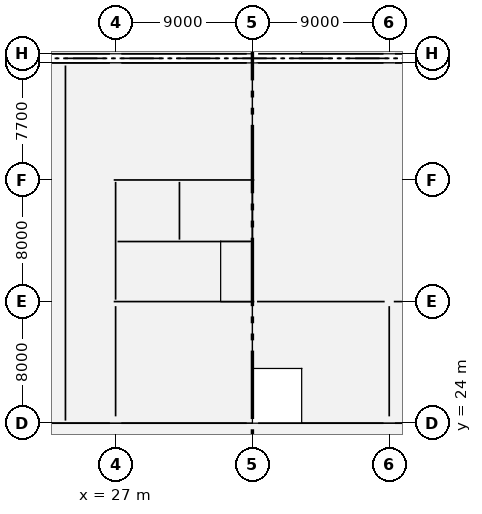
"""IFC4 building model, lengths in metres.
Left out: names, types, materials, properties, quantities, classifications, styles, units other than length and angle.
Written with IfcOpenShell. Run it as: python <this file> out.ifc"""

import sys

from ifc_helpers import new_model, si_unit, direction, frame, frame_2d, origin, origin_2d, place, context, subcontext, project, spatial, rectangle, extrude, element, fill, save


model = new_model("IFC4")
c1 = context("Model", 3, precision=1e-05, world=origin(), true_north=direction((0.0, 1.0)))
c2 = subcontext(c1, "Body", "Model", "MODEL_VIEW")
j1 = project(units=[si_unit("LENGTHUNIT", "METRE"), si_unit("PLANEANGLEUNIT", "RADIAN")], contexts=[c1])
p1 = place(None, origin())
s1 = spatial("IfcSite", under=j1, at=p1, CompositionType="ELEMENT")
p2 = place(p1, origin())
s2 = spatial("IfcBuilding", under=s1, at=p2, CompositionType="ELEMENT")
p3 = place(p2, origin())
s3 = spatial("IfcBuildingStorey", under=s2, at=p3, CompositionType="ELEMENT", Elevation=0.0)
for number, where, z_axis, x_axis in (
    (1, (27.0, 24.0, -0.5), (0.0, 0.0, 1.0), (1.0, 0.0, 0.0)),
    (2, (27.0, 32.0, -0.5), (0.0, 0.0, 1.0), (1.0, 0.0, 0.0)),
    (3, (27.0, 40.0, -0.5), (0.0, 0.0, 1.0), (1.0, 0.0, 0.0)),
):
    element("IfcColumn", number, at=place(p3, frame(where, z_axis=z_axis, x_axis=x_axis)), inside=s3, PredefinedType="COLUMN", context=c2, shape_type="SweptSolid", body=[
        extrude(rectangle(XDim=0.75, YDim=0.75, at=origin_2d()), origin(), (0.0, 0.0, 1.0), 6.8),
    ])
for number, where, z_axis, x_axis in (
    (4, (27.0, 47.7, -0.5), (0.0, 0.0, 1.0), (1.0, 0.0, 0.0)),
    (5, (27.0, 48.3, -0.5), (0.0, 0.0, 1.0), (1.0, 0.0, 0.0)),
):
    element("IfcColumn", number, at=place(p3, frame(where, z_axis=z_axis, x_axis=x_axis)), inside=s3, PredefinedType="COLUMN", context=c2, shape_type="SweptSolid", body=[
        extrude(rectangle(XDim=0.75, YDim=0.55, at=origin_2d()), origin(), (0.0, 0.0, 1.0), 6.8),
    ])
for number, where, z_axis, x_axis in (
    (6, (36.0, 24.0, -0.5), (0.0, 0.0, 1.0), (1.0, 0.0, 0.0)),
    (7, (36.0, 32.0, -0.5), (0.0, 0.0, 1.0), (1.0, 0.0, 0.0)),
    (8, (36.0, 40.0, -0.5), (0.0, 0.0, 1.0), (1.0, 0.0, 0.0)),
):
    element("IfcColumn", number, at=place(p3, frame(where, z_axis=z_axis, x_axis=x_axis)), inside=s3, PredefinedType="COLUMN", context=c2, shape_type="SweptSolid", body=[
        extrude(rectangle(XDim=0.75, YDim=0.75, at=origin_2d()), origin(), (0.0, 0.0, 1.0), 6.8),
    ])
for number, where, z_axis, x_axis in (
    (9, (36.0, 47.7, -0.5), (0.0, 0.0, 1.0), (1.0, 0.0, 0.0)),
    (10, (36.0, 48.3, -0.5), (0.0, 0.0, 1.0), (1.0, 0.0, 0.0)),
):
    element("IfcColumn", number, at=place(p3, frame(where, z_axis=z_axis, x_axis=x_axis)), inside=s3, PredefinedType="COLUMN", context=c2, shape_type="SweptSolid", body=[
        extrude(rectangle(XDim=0.75, YDim=0.55, at=origin_2d()), origin(), (0.0, 0.0, 1.0), 6.8),
    ])
for number, where, z_axis, x_axis in (
    (11, (45.0, 24.0, -0.5), (0.0, 0.0, 1.0), (1.0, 0.0, 0.0)),
    (12, (45.0, 32.0, -0.5), (0.0, 0.0, 1.0), (1.0, 0.0, 0.0)),
    (13, (45.0, 40.0, -0.5), (0.0, 0.0, 1.0), (1.0, 0.0, 0.0)),
):
    element("IfcColumn", number, at=place(p3, frame(where, z_axis=z_axis, x_axis=x_axis)), inside=s3, PredefinedType="COLUMN", context=c2, shape_type="SweptSolid", body=[
        extrude(rectangle(XDim=0.75, YDim=0.75, at=origin_2d()), origin(), (0.0, 0.0, 1.0), 6.8),
    ])
for number, where, z_axis, x_axis in (
    (14, (45.0, 47.7, -0.5), (0.0, 0.0, 1.0), (1.0, 0.0, 0.0)),
    (15, (45.0, 48.3, -0.5), (0.0, 0.0, 1.0), (1.0, 0.0, 0.0)),
):
    element("IfcColumn", number, at=place(p3, frame(where, z_axis=z_axis, x_axis=x_axis)), inside=s3, PredefinedType="COLUMN", context=c2, shape_type="SweptSolid", body=[
        extrude(rectangle(XDim=0.75, YDim=0.55, at=origin_2d()), origin(), (0.0, 0.0, 1.0), 6.8),
    ])
p4 = place(p3, frame((18.375, 24.0, 0.0), z_axis=(0.0, 0.0, 1.0), x_axis=(1.0, 0.0, 0.0)))
e16 = element("IfcWall", 16, at=p4, inside=s3, PredefinedType="SOLIDWALL", context=c2, shape_type="SweptSolid", body=[
    extrude(rectangle(XDim=8.25, YDim=0.38, at=frame_2d((4.125, 0.0))), origin(), (0.0, 0.0, 1.0), 5.08),
])
p5 = place(p3, frame((27.375, 24.0, 0.0), z_axis=(0.0, 0.0, 1.0), x_axis=(1.0, 0.0, 0.0)))
e17 = element("IfcWall", 17, at=p5, inside=s3, PredefinedType="SOLIDWALL", context=c2, shape_type="SweptSolid", body=[
    extrude(rectangle(XDim=8.25, YDim=0.38, at=frame_2d((4.125, 0.0))), origin(), (0.0, 0.0, 1.0), 5.08),
])
p6 = place(p5, frame((3.325, 0.0, 3.59)))
e18 = element("IfcOpeningElement", 18, at=p6, cuts=e17, PredefinedType="OPENING", context=c2, shape_type="SweptSolid", body=[
    extrude(rectangle(XDim=1.6, YDim=1.45, at=frame_2d((0.8, 0.725))), frame((0.0, 0.2, 0.0), z_axis=(0.0, -1.0, 0.0), x_axis=(1.0, 0.0, 0.0)), (0.0, 0.0, 1.0), 0.4),
])
p7 = place(p3, frame((36.375, 24.0, 0.0), z_axis=(0.0, 0.0, 1.0), x_axis=(1.0, 0.0, 0.0)))
e19 = element("IfcWall", 19, at=p7, inside=s3, PredefinedType="SOLIDWALL", context=c2, shape_type="SweptSolid", body=[
    extrude(rectangle(XDim=8.25, YDim=0.38, at=frame_2d((4.125, 0.0))), origin(), (0.0, 0.0, 1.0), 5.08),
])
p8 = place(p3, frame((45.375, 24.0, 0.0), z_axis=(0.0, 0.0, 1.0), x_axis=(1.0, 0.0, 0.0)))
e20 = element("IfcWall", 20, at=p8, inside=s3, PredefinedType="SOLIDWALL", context=c2, shape_type="SweptSolid", body=[
    extrude(rectangle(XDim=8.3, YDim=0.38, at=frame_2d((4.15, 0.0))), origin(), (0.0, 0.0, 1.0), 5.08),
])
p9 = place(p8, frame((3.35, 0.0, 3.59)))
e21 = element("IfcOpeningElement", 21, at=p9, cuts=e20, PredefinedType="OPENING", context=c2, shape_type="SweptSolid", body=[
    extrude(rectangle(XDim=1.6, YDim=1.45, at=frame_2d((0.8, 0.725))), frame((0.0, 0.2, 0.0), z_axis=(0.0, -1.0, 0.0), x_axis=(1.0, 0.0, 0.0)), (0.0, 0.0, 1.0), 0.4),
])
for number, where, z_axis, x_axis in (
    (22, (18.375, 47.7, 0.0), (0.0, 0.0, 1.0), (1.0, 0.0, 0.0)),
    (23, (27.375, 47.7, 0.0), (0.0, 0.0, 1.0), (1.0, 0.0, 0.0)),
    (24, (36.375, 47.7, 0.0), (0.0, 0.0, 1.0), (1.0, 0.0, 0.0)),
    (25, (45.375, 47.7, 0.0), (0.0, 0.0, 1.0), (1.0, 0.0, 0.0)),
):
    element("IfcWall", number, at=place(p3, frame(where, z_axis=z_axis, x_axis=x_axis)), inside=s3, PredefinedType="SOLIDWALL", context=c2, shape_type="SweptSolid", body=[
        extrude(rectangle(XDim=8.25, YDim=0.38, at=frame_2d((4.125, 0.0))), origin(), (0.0, 0.0, 1.0), 5.08),
    ])
p10 = place(p3, frame((18.375, 48.3, 0.0), z_axis=(0.0, 0.0, 1.0), x_axis=(1.0, 0.0, 0.0)))
e26 = element("IfcWall", 26, at=p10, inside=s3, PredefinedType="SOLIDWALL", context=c2, shape_type="SweptSolid", body=[
    extrude(rectangle(XDim=8.25, YDim=0.38, at=frame_2d((4.125, 0.0))), origin(), (0.0, 0.0, 1.0), 5.08),
])
p11 = place(p10, frame((3.325, 0.0, 3.59)))
e27 = element("IfcOpeningElement", 27, at=p11, cuts=e26, PredefinedType="OPENING", context=c2, shape_type="SweptSolid", body=[
    extrude(rectangle(XDim=1.6, YDim=1.45, at=frame_2d((0.8, 0.725))), frame((0.0, 0.2, 0.0), z_axis=(0.0, -1.0, 0.0), x_axis=(1.0, 0.0, 0.0)), (0.0, 0.0, 1.0), 0.4),
])
p12 = place(p3, frame((27.375, 48.3, 0.0), z_axis=(0.0, 0.0, 1.0), x_axis=(1.0, 0.0, 0.0)))
e28 = element("IfcWall", 28, at=p12, inside=s3, PredefinedType="SOLIDWALL", context=c2, shape_type="SweptSolid", body=[
    extrude(rectangle(XDim=8.25, YDim=0.38, at=frame_2d((4.125, 0.0))), origin(), (0.0, 0.0, 1.0), 5.08),
])
p13 = place(p3, frame((36.375, 48.3, 0.0), z_axis=(0.0, 0.0, 1.0), x_axis=(1.0, 0.0, 0.0)))
e29 = element("IfcWall", 29, at=p13, inside=s3, PredefinedType="SOLIDWALL", context=c2, shape_type="SweptSolid", body=[
    extrude(rectangle(XDim=8.25, YDim=0.38, at=frame_2d((4.125, 0.0))), origin(), (0.0, 0.0, 1.0), 5.08),
])
p14 = place(p13, frame((3.325, 0.0, 3.59)))
e30 = element("IfcOpeningElement", 30, at=p14, cuts=e29, PredefinedType="OPENING", context=c2, shape_type="SweptSolid", body=[
    extrude(rectangle(XDim=1.6, YDim=1.45, at=frame_2d((0.8, 0.725))), frame((0.0, 0.2, 0.0), z_axis=(0.0, -1.0, 0.0), x_axis=(1.0, 0.0, 0.0)), (0.0, 0.0, 1.0), 0.4),
])
p15 = place(p3, frame((45.375, 48.3, 0.0), z_axis=(0.0, 0.0, 1.0), x_axis=(1.0, 0.0, 0.0)))
e31 = element("IfcWall", 31, at=p15, inside=s3, PredefinedType="SOLIDWALL", context=c2, shape_type="SweptSolid", body=[
    extrude(rectangle(XDim=8.25, YDim=0.38, at=frame_2d((4.125, 0.0))), origin(), (0.0, 0.0, 1.0), 5.08),
])
for number, where, z_axis, x_axis in (
    (32, (26.875, 32.0, -0.5), (0.0, 0.0, 1.0), (1.0, 0.0, 0.0)),
    (33, (26.875, 40.0, -0.5), (0.0, 0.0, 1.0), (1.0, 0.0, 0.0)),
):
    element("IfcWall", number, at=place(p3, frame(where, z_axis=z_axis, x_axis=x_axis)), inside=s3, PredefinedType="SOLIDWALL", context=c2, shape_type="SweptSolid", body=[
        extrude(rectangle(XDim=9.25, YDim=0.25, at=frame_2d((4.625, 0.0))), origin(), (0.0, 0.0, 1.0), 6.8),
    ])
p16 = place(p3, frame((27.0, 32.125, -0.5), z_axis=(0.0, 0.0, 1.0), x_axis=(0.0, 1.0, 0.0)))
e34 = element("IfcWall", 34, at=p16, inside=s3, PredefinedType="SOLIDWALL", context=c2, shape_type="SweptSolid", body=[
    extrude(rectangle(XDim=7.75, YDim=0.25, at=frame_2d((3.875, 0.0))), origin(), (0.0, 0.0, 1.0), 6.8),
])
p17 = place(p16, frame((1.15, 0.0, 0.5)))
e35 = element("IfcOpeningElement", 35, at=p17, cuts=e34, PredefinedType="OPENING", context=c2, shape_type="SweptSolid", body=[
    extrude(rectangle(XDim=1.2, YDim=2.2, at=frame_2d((0.6, 1.1))), frame((0.0, 0.135, 0.0), z_axis=(0.0, -1.0, 0.0), x_axis=(1.0, 0.0, 0.0)), (0.0, 0.0, 1.0), 0.27),
])
p18 = place(p3, frame((36.0, 32.125, -0.5), z_axis=(0.0, 0.0, 1.0), x_axis=(0.0, 1.0, 0.0)))
e36 = element("IfcWall", 36, at=p18, inside=s3, PredefinedType="SOLIDWALL", context=c2, shape_type="SweptSolid", body=[
    extrude(rectangle(XDim=7.75, YDim=0.25, at=frame_2d((3.875, 0.0))), origin(), (0.0, 0.0, 1.0), 6.8),
])
p19 = place(p18, frame((4.9, 0.0, 0.5)))
e37 = element("IfcOpeningElement", 37, at=p19, cuts=e36, PredefinedType="OPENING", context=c2, shape_type="SweptSolid", body=[
    extrude(rectangle(XDim=1.6, YDim=2.2, at=frame_2d((0.8, 1.1))), frame((0.0, 0.135, 0.0), z_axis=(0.0, -1.0, 0.0), x_axis=(1.0, 0.0, 0.0)), (0.0, 0.0, 1.0), 0.27),
])
p20 = place(p3, frame((27.125, 35.95, -0.5), z_axis=(0.0, 0.0, 1.0), x_axis=(1.0, 0.0, 0.0)))
e38 = element("IfcWall", 38, at=p20, inside=s3, PredefinedType="SOLIDWALL", context=c2, shape_type="SweptSolid", body=[
    extrude(rectangle(XDim=8.75, YDim=0.25, at=frame_2d((4.375, 0.0))), origin(), (0.0, 0.0, 1.0), 6.8),
])
p21 = place(p3, frame((31.2, 36.075, -0.5), z_axis=(0.0, 0.0, 1.0), x_axis=(0.0, 1.0, 0.0)))
e39 = element("IfcWall", 39, at=p21, inside=s3, PredefinedType="SOLIDWALL", context=c2, shape_type="SweptSolid", body=[
    extrude(rectangle(XDim=3.8, YDim=0.25, at=frame_2d((1.9, 0.0))), origin(), (0.0, 0.0, 1.0), 6.8),
])
p22 = place(p21, frame((1.1, 0.0, 0.5)))
e40 = element("IfcOpeningElement", 40, at=p22, cuts=e39, PredefinedType="OPENING", context=c2, shape_type="SweptSolid", body=[
    extrude(rectangle(XDim=1.6, YDim=2.4, at=frame_2d((0.8, 1.2))), frame((0.0, 0.135, 0.0), z_axis=(0.0, -1.0, 0.0), x_axis=(1.0, 0.0, 0.0)), (0.0, 0.0, 1.0), 0.27),
])
p23 = place(p3, frame((23.7, 24.17, 0.0), z_axis=(0.0, 0.0, 1.0), x_axis=(0.0, 1.0, 0.0)))
e41 = element("IfcWall", 41, at=p23, inside=s3, PredefinedType="PARTITIONING", context=c2, shape_type="SweptSolid", body=[
    extrude(rectangle(XDim=23.36, YDim=0.14, at=frame_2d((11.68, 0.0))), origin(), (0.0, 0.0, 1.0), 5.95),
])
p24 = place(p23, frame((11.33, 0.0, 0.0)))
e42 = element("IfcOpeningElement", 42, at=p24, cuts=e41, PredefinedType="OPENING", context=c2, shape_type="SweptSolid", body=[
    extrude(rectangle(XDim=1.0, YDim=2.15, at=frame_2d((0.5, 1.075))), frame((0.0, 0.08, 0.0), z_axis=(0.0, -1.0, 0.0), x_axis=(1.0, 0.0, 0.0)), (0.0, 0.0, 1.0), 0.16),
])
p25 = place(p3, frame((27.0, 24.45, 0.0), z_axis=(0.0, 0.0, 1.0), x_axis=(0.0, 1.0, 0.0)))
e43 = element("IfcWall", 43, at=p25, inside=s3, PredefinedType="PARTITIONING", context=c2, shape_type="SweptSolid", body=[
    extrude(rectangle(XDim=7.25, YDim=0.2, at=frame_2d((3.625, 0.0))), origin(), (0.0, 0.0, 1.0), 5.33),
])
p26 = place(p25, frame((2.725, 0.0, 0.0)))
e44 = element("IfcOpeningElement", 44, at=p26, cuts=e43, PredefinedType="OPENING", context=c2, shape_type="SweptSolid", body=[
    extrude(rectangle(XDim=1.8, YDim=2.3, at=frame_2d((0.9, 1.15))), frame((0.0, 0.11, 0.0), z_axis=(0.0, -1.0, 0.0), x_axis=(1.0, 0.0, 0.0)), (0.0, 0.0, 1.0), 0.22),
])
p27 = place(p3, frame((45.0, 24.45, 0.0), z_axis=(0.0, 0.0, 1.0), x_axis=(0.0, 1.0, 0.0)))
e45 = element("IfcWall", 45, at=p27, inside=s3, PredefinedType="PARTITIONING", context=c2, shape_type="SweptSolid", body=[
    extrude(rectangle(XDim=7.25, YDim=0.165, at=frame_2d((3.625, 0.0))), origin(), (0.0, 0.0, 1.0), 5.33),
])
p28 = place(p3, frame((36.3, 32.0, 0.0), z_axis=(0.0, 0.0, 1.0), x_axis=(1.0, 0.0, 0.0)))
e46 = element("IfcWall", 46, at=p28, inside=s3, PredefinedType="PARTITIONING", context=c2, shape_type="SweptSolid", body=[
    extrude(rectangle(XDim=8.4, YDim=0.225, at=frame_2d((4.2, 0.0))), origin(), (0.0, 0.0, 1.0), 5.13),
])
p29 = place(p3, frame((45.3, 32.0, 0.0), z_axis=(0.0, 0.0, 1.0), x_axis=(1.0, 0.0, 0.0)))
e47 = element("IfcWall", 47, at=p29, inside=s3, PredefinedType="PARTITIONING", context=c2, shape_type="SweptSolid", body=[
    extrude(rectangle(XDim=17.55, YDim=0.2, at=frame_2d((8.775, 0.0))), origin(), (0.0, 0.0, 1.0), 5.13),
])
p30 = place(p6, origin())
e48 = element("IfcWindow", 48, at=p30, inside=s3, PartitioningType="DOUBLE_PANEL_HORIZONTAL", PredefinedType="WINDOW", context=c2, shape_type="SweptSolid", body=[
    extrude(rectangle(XDim=1.6, YDim=1.45, at=frame_2d((0.8, 0.725))), frame((0.0, 0.03, 0.0), z_axis=(0.0, -1.0, 0.0), x_axis=(1.0, 0.0, 0.0)), (0.0, 0.0, 1.0), 0.06),
])
fill(e18, e48)
p31 = place(p11, origin())
e49 = element("IfcWindow", 49, at=p31, inside=s3, PartitioningType="DOUBLE_PANEL_HORIZONTAL", PredefinedType="WINDOW", context=c2, shape_type="SweptSolid", body=[
    extrude(rectangle(XDim=1.6, YDim=1.45, at=frame_2d((0.8, 0.725))), frame((0.0, 0.03, 0.0), z_axis=(0.0, -1.0, 0.0), x_axis=(1.0, 0.0, 0.0)), (0.0, 0.0, 1.0), 0.06),
])
fill(e27, e49)
p32 = place(p14, origin())
e50 = element("IfcWindow", 50, at=p32, inside=s3, PartitioningType="DOUBLE_PANEL_HORIZONTAL", PredefinedType="WINDOW", context=c2, shape_type="SweptSolid", body=[
    extrude(rectangle(XDim=1.6, YDim=1.45, at=frame_2d((0.8, 0.725))), frame((0.0, 0.03, 0.0), z_axis=(0.0, -1.0, 0.0), x_axis=(1.0, 0.0, 0.0)), (0.0, 0.0, 1.0), 0.06),
])
fill(e30, e50)
p33 = place(p22, origin())
e51 = element("IfcDoor", 51, at=p33, inside=s3, OperationType="SLIDING_TO_LEFT", PredefinedType="DOOR", context=c2, shape_type="SweptSolid", body=[
    extrude(rectangle(XDim=1.6, YDim=2.4, at=frame_2d((0.8, 1.2))), frame((0.0, 0.025, 0.0), z_axis=(0.0, -1.0, 0.0), x_axis=(1.0, 0.0, 0.0)), (0.0, 0.0, 1.0), 0.05),
])
fill(e40, e51)
p34 = place(p17, origin())
e52 = element("IfcDoor", 52, at=p34, inside=s3, OperationType="SINGLE_SWING_LEFT", PredefinedType="DOOR", context=c2, shape_type="SweptSolid", body=[
    extrude(rectangle(XDim=1.2, YDim=2.2, at=frame_2d((0.6, 1.1))), frame((0.0, 0.025, 0.0), z_axis=(0.0, -1.0, 0.0), x_axis=(1.0, 0.0, 0.0)), (0.0, 0.0, 1.0), 0.05),
])
fill(e35, e52)
p35 = place(p19, origin())
e53 = element("IfcDoor", 53, at=p35, inside=s3, OperationType="SINGLE_SWING_RIGHT", PredefinedType="DOOR", context=c2, shape_type="SweptSolid", body=[
    extrude(rectangle(XDim=1.6, YDim=2.2, at=frame_2d((0.8, 1.1))), frame((0.0, 0.025, 0.0), z_axis=(0.0, -1.0, 0.0), x_axis=(1.0, 0.0, 0.0)), (0.0, 0.0, 1.0), 0.05),
])
fill(e37, e53)
p36 = place(p24, origin())
e54 = element("IfcDoor", 54, at=p36, inside=s3, OperationType="SINGLE_SWING_RIGHT", PredefinedType="DOOR", context=c2, shape_type="SweptSolid", body=[
    extrude(rectangle(XDim=1.0, YDim=2.15, at=frame_2d((0.5, 1.075))), frame((0.0, 0.025, 0.0), z_axis=(0.0, -1.0, 0.0), x_axis=(1.0, 0.0, 0.0)), (0.0, 0.0, 1.0), 0.05),
])
fill(e42, e54)
p37 = place(p26, origin())
e55 = element("IfcDoor", 55, at=p37, inside=s3, OperationType="SINGLE_SWING_LEFT", PredefinedType="DOOR", context=c2, shape_type="SweptSolid", body=[
    extrude(rectangle(XDim=1.8, YDim=2.3, at=frame_2d((0.9, 1.15))), frame((0.0, 0.025, 0.0), z_axis=(0.0, -1.0, 0.0), x_axis=(1.0, 0.0, 0.0)), (0.0, 0.0, 1.0), 0.05),
])
fill(e44, e55)
save(model, sys.argv[1])
